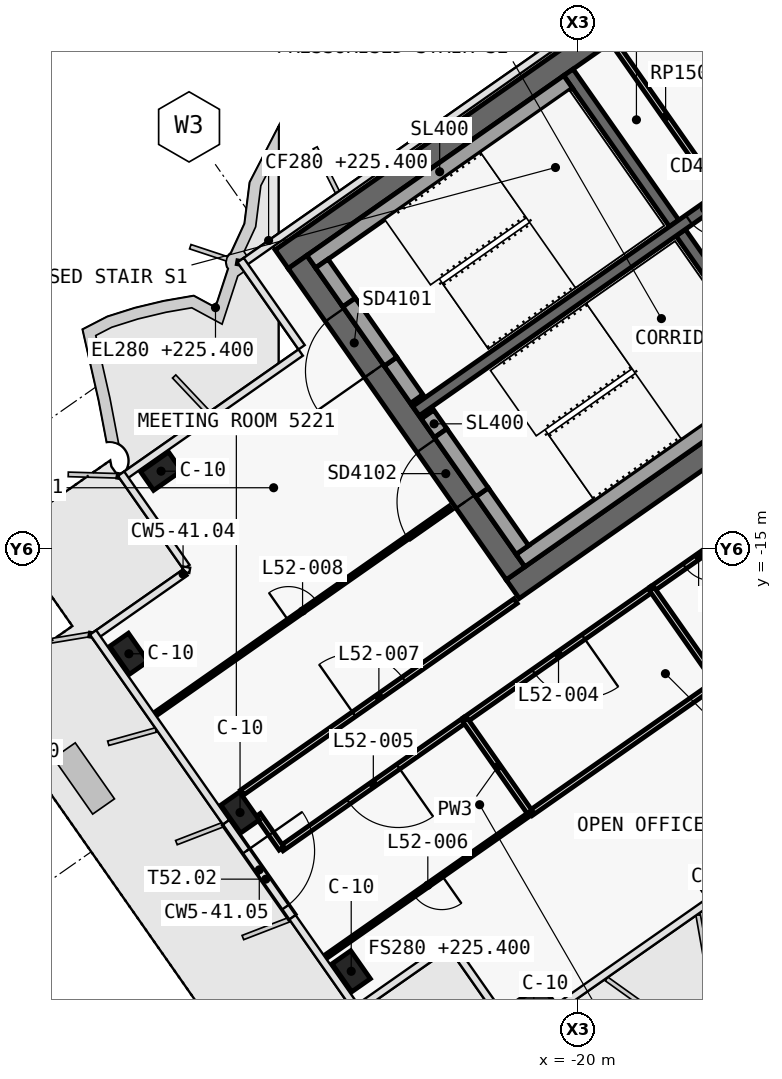
"""IFC4 building model, lengths in metres.
Left out: names, types, materials, properties, quantities, classifications, styles, units other than length and angle.
Written with IfcOpenShell. Run it as: python <this file> out.ifc"""

import sys

from ifc_helpers import new_model, si_unit, direction, frame, frame_2d, origin, origin_2d, place, context, subcontext, project, spatial, polyline, rectangle, outline, extrude, element, fill, save


model = new_model("IFC4")
c1 = context("Model", 3, precision=1e-05, world=origin(), true_north=direction((0.0, 1.0)))
c2 = subcontext(c1, "Body", "Model", "MODEL_VIEW")
j1 = project(units=[si_unit("LENGTHUNIT", "METRE"), si_unit("PLANEANGLEUNIT", "RADIAN")], contexts=[c1])
p1 = place(None, origin())
s1 = spatial("IfcSite", under=j1, at=p1, CompositionType="ELEMENT")
p2 = place(p1, origin())
s2 = spatial("IfcBuilding", under=s1, at=p2, CompositionType="ELEMENT")
p3 = place(p2, frame((0.0, 0.0, 225.4)))
s3 = spatial("IfcBuildingStorey", under=s2, at=p3, CompositionType="ELEMENT", Elevation=225.4)
p4 = place(p3, frame((-0.028, 12.066, 0.0), z_axis=(0.0, 0.0, 1.0), x_axis=(-0.819151382952, -0.573577380837, 0.0)))
e1 = element("IfcWall", 1, at=p4, inside=s3, PredefinedType="SHEAR", context=c2, shape_type="SweptSolid", body=[
    extrude(outline(polyline([(33.898, 0.3), (0.42, 0.3), (0.0, -0.3), (33.898, -0.3), (33.898, 0.3)])), origin(), (0.0, 0.0, 1.0), 3.9),
])
p5 = place(p3, frame((-0.028, -0.874, 0.0), z_axis=(0.0, 0.0, 1.0), x_axis=(-0.819150035022, -0.573579305871, 0.0)))
e2 = element("IfcWall", 2, at=p5, inside=s3, PredefinedType="SHEAR", context=c2, shape_type="SweptSolid", body=[
    extrude(outline(polyline([(26.476, 0.3), (0.42, 0.3), (0.0, -0.3), (26.476, -0.3), (26.476, 0.3)])), origin(), (0.0, 0.0, 1.0), 3.9),
])
p6 = place(p5, frame((2.976, 0.0, 0.0)))
e3 = element("IfcOpeningElement", 3, at=p6, cuts=e2, PredefinedType="OPENING", context=c2, shape_type="SweptSolid", body=[
    extrude(rectangle(XDim=2.4, YDim=2.1, at=frame_2d((1.2, 1.05))), frame((0.0, 0.31, 0.0), z_axis=(0.0, -1.0, 0.0), x_axis=(1.0, 0.0, 0.0)), (0.0, 0.0, 1.0), 0.62),
])
p7 = place(p5, frame((11.776, 0.0, 0.0)))
e4 = element("IfcOpeningElement", 4, at=p7, cuts=e2, PredefinedType="OPENING", context=c2, shape_type="SweptSolid", body=[
    extrude(rectangle(XDim=2.4, YDim=2.1, at=frame_2d((1.2, 1.05))), frame((0.0, 0.31, 0.0), z_axis=(0.0, -1.0, 0.0), x_axis=(1.0, 0.0, 0.0)), (0.0, 0.0, 1.0), 0.62),
])
p8 = place(p3, frame((-21.642, -15.642, 0.0), z_axis=(0.0, 0.0, 1.0), x_axis=(-0.573586866468, 0.819144740944, 0.0)))
e5 = element("IfcWall", 5, at=p8, inside=s3, PredefinedType="SHEAR", context=c2, shape_type="SweptSolid", body=[
    extrude(outline(polyline([(0.0, 0.3), (0.0, -0.3), (10.0, -0.3), (10.0, 0.3), (0.0, 0.3)])), origin(), (0.0, 0.0, 1.0), 3.9),
])
p9 = place(p8, frame((6.5, 0.0, 0.0)))
e6 = element("IfcOpeningElement", 6, at=p9, cuts=e5, PredefinedType="OPENING", context=c2, shape_type="SweptSolid", body=[
    extrude(rectangle(XDim=1.8, YDim=2.1, at=frame_2d((0.9, 1.05))), frame((0.0, 0.31, 0.0), z_axis=(0.0, -1.0, 0.0), x_axis=(1.0, 0.0, 0.0)), (0.0, 0.0, 1.0), 0.62),
])
p10 = place(p8, frame((2.3, 0.0, 0.0)))
e7 = element("IfcOpeningElement", 7, at=p10, cuts=e5, PredefinedType="OPENING", context=c2, shape_type="SweptSolid", body=[
    extrude(rectangle(XDim=1.8, YDim=2.1, at=frame_2d((0.9, 1.05))), frame((0.0, 0.31, 0.0), z_axis=(0.0, -1.0, 0.0), x_axis=(1.0, 0.0, 0.0)), (0.0, 0.0, 1.0), 0.62),
])
p11 = place(p3, frame((-14.515, -10.652, 0.0), z_axis=(0.0, 0.0, 1.0), x_axis=(-0.573560315113, 0.819163332265, 0.0)))
e8 = element("IfcWall", 8, at=p11, inside=s3, PredefinedType="SHEAR", context=c2, shape_type="SweptSolid", body=[
    extrude(outline(polyline([(4.85, 0.15), (0.0, 0.15), (0.0, -0.15), (4.85, -0.15), (4.85, 0.15)])), origin(), (0.0, 0.0, 1.0), 3.9),
])
p12 = place(p3, frame((-17.469, -6.433, 0.0), z_axis=(0.0, 0.0, 1.0), x_axis=(-0.573594092424, 0.81913968109, 0.0)))
e9 = element("IfcWall", 9, at=p12, inside=s3, PredefinedType="SHEAR", context=c2, shape_type="SweptSolid", body=[
    extrude(outline(polyline([(4.85, -0.15), (4.85, 0.15), (0.0, 0.15), (0.0, -0.15), (4.85, -0.15)])), origin(), (0.0, 0.0, 1.0), 3.9),
])
p13 = place(p3, frame((-2.638, 3.768, 0.0), z_axis=(0.0, 0.0, 1.0), x_axis=(-0.819155014212, -0.573572194837, 0.0)))
e10 = element("IfcWall", 10, at=p13, inside=s3, PredefinedType="SHEAR", context=c2, shape_type="SweptSolid", body=[
    extrude(outline(polyline([(26.4, 0.15), (0.0, 0.15), (0.0, -0.15), (26.4, -0.15), (26.4, 0.15)])), origin(), (0.0, 0.0, 1.0), 3.9),
])
p14 = place(p13, frame((1.169, 0.0, 0.0)))
e11 = element("IfcOpeningElement", 11, at=p14, cuts=e10, PredefinedType="OPENING", context=c2, shape_type="SweptSolid", body=[
    extrude(rectangle(XDim=1.1, YDim=2.1, at=frame_2d((0.55, 1.05))), frame((0.0, 0.16, 0.0), z_axis=(0.0, -1.0, 0.0), x_axis=(1.0, 0.0, 0.0)), (0.0, 0.0, 1.0), 0.32),
])
p15 = place(p13, frame((3.206, 0.0, 0.0)))
e12 = element("IfcOpeningElement", 12, at=p15, cuts=e10, PredefinedType="OPENING", context=c2, shape_type="SweptSolid", body=[
    extrude(rectangle(XDim=1.1, YDim=2.1, at=frame_2d((0.55, 1.05))), frame((0.0, 0.16, 0.0), z_axis=(0.0, -1.0, 0.0), x_axis=(1.0, 0.0, 0.0)), (0.0, 0.0, 1.0), 0.32),
])
p16 = place(p13, frame((5.244, 0.0, 0.0)))
e13 = element("IfcOpeningElement", 13, at=p16, cuts=e10, PredefinedType="OPENING", context=c2, shape_type="SweptSolid", body=[
    extrude(rectangle(XDim=1.1, YDim=2.1, at=frame_2d((0.55, 1.05))), frame((0.0, 0.16, 0.0), z_axis=(0.0, -1.0, 0.0), x_axis=(1.0, 0.0, 0.0)), (0.0, 0.0, 1.0), 0.32),
])
p17 = place(p13, frame((7.281, 0.0, 0.0)))
e14 = element("IfcOpeningElement", 14, at=p17, cuts=e10, PredefinedType="OPENING", context=c2, shape_type="SweptSolid", body=[
    extrude(rectangle(XDim=1.1, YDim=2.1, at=frame_2d((0.55, 1.05))), frame((0.0, 0.16, 0.0), z_axis=(0.0, -1.0, 0.0), x_axis=(1.0, 0.0, 0.0)), (0.0, 0.0, 1.0), 0.32),
])
p18 = place(p13, frame((9.688, 0.0, 0.0)))
e15 = element("IfcOpeningElement", 15, at=p18, cuts=e10, PredefinedType="OPENING", context=c2, shape_type="SweptSolid", body=[
    extrude(rectangle(XDim=1.1, YDim=2.1, at=frame_2d((0.55, 1.05))), frame((0.0, 0.16, 0.0), z_axis=(0.0, -1.0, 0.0), x_axis=(1.0, 0.0, 0.0)), (0.0, 0.0, 1.0), 0.32),
])
p19 = place(p13, frame((11.863, 0.0, 0.0)))
e16 = element("IfcOpeningElement", 16, at=p19, cuts=e10, PredefinedType="OPENING", context=c2, shape_type="SweptSolid", body=[
    extrude(rectangle(XDim=1.1, YDim=2.1, at=frame_2d((0.55, 1.05))), frame((0.0, 0.16, 0.0), z_axis=(0.0, -1.0, 0.0), x_axis=(1.0, 0.0, 0.0)), (0.0, 0.0, 1.0), 0.32),
])
p20 = place(p13, frame((14.552, 0.0, 0.0)))
e17 = element("IfcOpeningElement", 17, at=p20, cuts=e10, PredefinedType="OPENING", context=c2, shape_type="SweptSolid", body=[
    extrude(rectangle(XDim=1.0, YDim=2.1, at=frame_2d((0.5, 1.05))), frame((0.0, 0.16, 0.0), z_axis=(0.0, -1.0, 0.0), x_axis=(1.0, 0.0, 0.0)), (0.0, 0.0, 1.0), 0.32),
])
p21 = place(p13, frame((16.627, 0.0, 0.0)))
e18 = element("IfcOpeningElement", 18, at=p21, cuts=e10, PredefinedType="OPENING", context=c2, shape_type="SweptSolid", body=[
    extrude(rectangle(XDim=1.0, YDim=2.1, at=frame_2d((0.5, 1.05))), frame((0.0, 0.16, 0.0), z_axis=(0.0, -1.0, 0.0), x_axis=(1.0, 0.0, 0.0)), (0.0, 0.0, 1.0), 0.32),
])
for number, where, z_axis, x_axis in (
    (19, (-16.41, -23.637, 0.0), (0.0, 0.0, 1.0), (-0.819, -0.574, 0.0)),
    (20, (-21.161, -26.964, 0.0), (0.0, 0.0, 1.0), (-0.819, -0.574, 0.0)),
    (21, (-30.969, -12.956, 0.0), (0.0, 0.0, 1.0), (-0.819, -0.574, 0.0)),
    (22, (-25.966, -26.117, 0.0), (0.0, 0.0, 1.0), (-0.574, 0.819, 0.0)),
    (23, (-28.891, -21.939, 0.0), (0.0, 0.0, 1.0), (-0.574, 0.819, 0.0)),
    (24, (-31.816, -17.761, 0.0), (0.0, 0.0, 1.0), (-0.574, 0.819, 0.0)),
):
    element("IfcColumn", number, at=place(p3, frame(where, z_axis=z_axis, x_axis=x_axis)), inside=s3, PredefinedType="COLUMN", context=c2, shape_type="SweptSolid", body=[
        extrude(rectangle(XDim=0.9, YDim=0.6, at=origin_2d()), origin(), (0.0, 0.0, 1.0), 3.9),
    ])
p22 = place(p3, frame((-16.302, -5.616, 0.0), z_axis=(0.0, 0.0, 1.0), x_axis=(-0.573560315113, 0.819163332265, 0.0)))
e25 = element("IfcWall", 25, at=p22, inside=s3, PredefinedType="PARTITIONING", context=c2, shape_type="SweptSolid", body=[
    extrude(rectangle(XDim=4.85, YDim=0.15, at=frame_2d((2.425, 0.0))), origin(), (0.0, 0.0, 1.0), 3.62),
])
p23 = place(p3, frame((-20.259, -2.71, 0.0), z_axis=(0.0, 0.0, 1.0), x_axis=(-0.81914849389, -0.573581506813, 0.0)))
e26 = element("IfcWall", 26, at=p23, inside=s3, PredefinedType="SOLIDWALL", context=c2, shape_type="SweptSolid", body=[
    extrude(rectangle(XDim=8.25, YDim=0.4, at=frame_2d((4.125, 0.0))), origin(), (0.0, 0.0, 1.0), 3.62),
])
p24 = place(p3, frame((-24.244, -11.055, 0.0), z_axis=(0.0, 0.0, 1.0), x_axis=(-0.573571582932, 0.819155442668, 0.0)))
e27 = element("IfcWall", 27, at=p24, inside=s3, PredefinedType="SOLIDWALL", context=c2, shape_type="SweptSolid", body=[
    extrude(rectangle(XDim=1.2, YDim=0.4, at=frame_2d((0.6, 0.0))), origin(), (0.0, 0.0, 1.0), 3.62),
])
p25 = place(p3, frame((-26.022, -8.515, 0.0), z_axis=(0.0, 0.0, 1.0), x_axis=(-0.573619628835, 0.819121798889, 0.0)))
e28 = element("IfcWall", 28, at=p25, inside=s3, PredefinedType="SOLIDWALL", context=c2, shape_type="SweptSolid", body=[
    extrude(rectangle(XDim=1.25, YDim=0.4, at=frame_2d((0.625, 0.0))), origin(), (0.0, 0.0, 1.0), 3.62),
])
p26 = place(p3, frame((-24.932, -10.072, 2.15), z_axis=(0.0, 0.0, 1.0), x_axis=(-0.573591692345, 0.819141361715, 0.0)))
e29 = element("IfcWall", 29, at=p26, inside=s3, PredefinedType="SOLIDWALL", context=c2, shape_type="SweptSolid", body=[
    extrude(rectangle(XDim=1.9, YDim=0.4, at=frame_2d((0.95, 0.0))), origin(), (0.0, 0.0, 1.0), 1.47),
])
p27 = place(p3, frame((-14.753, -10.574, 0.0), z_axis=(0.0, 0.0, 1.0), x_axis=(-0.819158229677, -0.573567602601, 0.0)))
e30 = element("IfcWall", 30, at=p27, inside=s3, PredefinedType="SOLIDWALL", context=c2, shape_type="SweptSolid", body=[
    extrude(rectangle(XDim=8.25, YDim=0.4, at=frame_2d((4.125, 0.0))), origin(), (0.0, 0.0, 1.0), 3.62),
])
p28 = place(p3, frame((-21.462, -15.028, 0.0), z_axis=(0.0, 0.0, 1.0), x_axis=(-0.573559770908, 0.819163713305, 0.0)))
e31 = element("IfcWall", 31, at=p28, inside=s3, PredefinedType="SOLIDWALL", context=c2, shape_type="SweptSolid", body=[
    extrude(rectangle(XDim=1.85, YDim=0.4, at=frame_2d((0.925, 0.0))), origin(), (0.0, 0.0, 1.0), 3.62),
])
p29 = place(p3, frame((-23.613, -11.956, 0.0), z_axis=(0.0, 0.0, 1.0), x_axis=(-0.573435029941, 0.819251039936, 0.0)))
e32 = element("IfcWall", 32, at=p29, inside=s3, PredefinedType="SOLIDWALL", context=c2, shape_type="SweptSolid", body=[
    extrude(rectangle(XDim=0.6, YDim=0.4, at=frame_2d((0.3, 0.0))), origin(), (0.0, 0.0, 1.0), 3.62),
])
p30 = place(p3, frame((-22.523, -13.512, 2.15), z_axis=(0.0, 0.0, 1.0), x_axis=(-0.573591692345, 0.819141361715, 0.0)))
e33 = element("IfcWall", 33, at=p30, inside=s3, PredefinedType="SOLIDWALL", context=c2, shape_type="SweptSolid", body=[
    extrude(rectangle(XDim=1.9, YDim=0.4, at=frame_2d((0.95, 0.0))), origin(), (0.0, 0.0, 1.0), 1.47),
])
p31 = place(p3, frame((-29.243, -22.222, 0.0), z_axis=(0.0, 0.0, 1.0), x_axis=(0.57360481557, -0.819132172213, 0.0)))
e34 = element("IfcWall", 34, at=p31, inside=s3, PredefinedType="SOLIDWALL", context=c2, shape_type="SweptSolid", body=[
    extrude(rectangle(XDim=2.99, YDim=0.2, at=frame_2d((1.495, 0.0))), origin(), (0.0, 0.0, 1.0), 3.62),
])
p32 = place(p31, frame((0.895, 0.0, 0.0)))
e35 = element("IfcOpeningElement", 35, at=p32, cuts=e34, PredefinedType="OPENING", context=c2, shape_type="SweptSolid", body=[
    extrude(rectangle(XDim=1.8, YDim=2.4, at=frame_2d((0.9, 1.2))), frame((0.0, 0.11, 0.0), z_axis=(0.0, -1.0, 0.0), x_axis=(1.0, 0.0, 0.0)), (0.0, 0.0, 1.0), 0.22),
])
p33 = place(p3, frame((-28.834, -21.411, 0.0), z_axis=(0.0, 0.0, 1.0), x_axis=(0.819144386599, 0.57358737251, 0.0)))
e36 = element("IfcWall", 36, at=p33, inside=s3, PredefinedType="PARTITIONING", context=c2, shape_type="SweptSolid", body=[
    extrude(rectangle(XDim=8.78, YDim=0.15, at=frame_2d((4.39, 0.0))), origin(), (0.0, 0.0, 1.0), 3.05),
])
p34 = place(p33, frame((3.59, 0.0, 0.0)))
e37 = element("IfcOpeningElement", 37, at=p34, cuts=e36, PredefinedType="OPENING", context=c2, shape_type="SweptSolid", body=[
    extrude(rectangle(XDim=1.6, YDim=2.1, at=frame_2d((0.8, 1.05))), frame((0.0, 0.085, 0.0), z_axis=(0.0, -1.0, 0.0), x_axis=(1.0, 0.0, 0.0)), (0.0, 0.0, 1.0), 0.17),
])
p35 = place(p3, frame((-15.594, -14.338, 0.0), z_axis=(0.0, 0.0, 1.0), x_axis=(-0.819193738533, -0.573516886193, 0.0)))
e38 = element("IfcWall", 38, at=p35, inside=s3, PredefinedType="PARTITIONING", context=c2, shape_type="SweptSolid", body=[
    extrude(rectangle(XDim=3.004, YDim=0.15, at=frame_2d((1.502, 0.0))), origin(), (0.0, 0.0, 1.0), 3.62),
])
p36 = place(p35, frame((1.052, 0.0, 0.0)))
e39 = element("IfcOpeningElement", 39, at=p36, cuts=e38, PredefinedType="OPENING", context=c2, shape_type="SweptSolid", body=[
    extrude(rectangle(XDim=0.9, YDim=2.1, at=frame_2d((0.45, 1.05))), frame((0.0, 0.085, 0.0), z_axis=(0.0, -1.0, 0.0), x_axis=(1.0, 0.0, 0.0)), (0.0, 0.0, 1.0), 0.17),
])
p37 = place(p3, frame((-18.052, -16.058, 0.0), z_axis=(0.0, 0.0, 1.0), x_axis=(-0.819145946981, -0.573585144111, 0.0)))
e40 = element("IfcWall", 40, at=p37, inside=s3, PredefinedType="PARTITIONING", context=c2, shape_type="SweptSolid", body=[
    extrude(rectangle(XDim=6.004, YDim=0.15, at=frame_2d((3.002, 0.0))), origin(), (0.0, 0.0, 1.0), 3.05),
])
p38 = place(p37, frame((2.202, 0.0, 0.0)))
e41 = element("IfcOpeningElement", 41, at=p38, cuts=e40, PredefinedType="OPENING", context=c2, shape_type="SweptSolid", body=[
    extrude(rectangle(XDim=1.6, YDim=2.1, at=frame_2d((0.8, 1.05))), frame((0.0, 0.085, 0.0), z_axis=(0.0, -1.0, 0.0), x_axis=(1.0, 0.0, 0.0)), (0.0, 0.0, 1.0), 0.17),
])
p39 = place(p3, frame((-22.967, -19.5, 0.0), z_axis=(0.0, 0.0, 1.0), x_axis=(-0.819156123335, -0.573570610825, 0.0)))
e42 = element("IfcWall", 42, at=p39, inside=s3, PredefinedType="PARTITIONING", context=c2, shape_type="SweptSolid", body=[
    extrude(rectangle(XDim=5.902, YDim=0.15, at=frame_2d((2.951, 0.0))), origin(), (0.0, 0.0, 1.0), 3.05),
])
p40 = place(p39, frame((2.151, 0.0, 0.0)))
e43 = element("IfcOpeningElement", 43, at=p40, cuts=e42, PredefinedType="OPENING", context=c2, shape_type="SweptSolid", body=[
    extrude(rectangle(XDim=1.6, YDim=2.1, at=frame_2d((0.8, 1.05))), frame((0.0, 0.085, 0.0), z_axis=(0.0, -1.0, 0.0), x_axis=(1.0, 0.0, 0.0)), (0.0, 0.0, 1.0), 0.17),
])
p41 = place(p3, frame((-27.802, -22.885, 0.0), z_axis=(0.0, 0.0, 1.0), x_axis=(-0.573629982879, 0.819114547998, 0.0)))
e44 = element("IfcWall", 44, at=p41, inside=s3, PredefinedType="PARTITIONING", context=c2, shape_type="SweptSolid", body=[
    extrude(rectangle(XDim=1.075, YDim=0.15, at=frame_2d((0.538, 0.0))), origin(), (0.0, 0.0, 1.0), 3.62),
])
p42 = place(p3, frame((-31.129, -19.354, 0.0), z_axis=(0.0, 0.0, 1.0), x_axis=(0.819154480923, 0.573572956461, 0.0)))
e45 = element("IfcWall", 45, at=p42, inside=s3, PredefinedType="PARTITIONING", context=c2, shape_type="SweptSolid", body=[
    extrude(rectangle(XDim=9.48, YDim=0.1, at=frame_2d((4.74, 0.0))), origin(), (0.0, 0.0, 1.0), 3.0),
])
p43 = place(p42, frame((4.29, 0.0, 0.0)))
e46 = element("IfcOpeningElement", 46, at=p43, cuts=e45, PredefinedType="OPENING", context=c2, shape_type="SweptSolid", body=[
    extrude(rectangle(XDim=0.9, YDim=2.1, at=frame_2d((0.45, 1.05))), frame((0.0, 0.06, 0.0), z_axis=(0.0, -1.0, 0.0), x_axis=(1.0, 0.0, 0.0)), (0.0, 0.0, 1.0), 0.12),
])
p44 = place(p3, frame((-16.332, -18.519, 0.0), z_axis=(0.0, 0.0, 1.0), x_axis=(-0.573604249862, 0.819132568355, 0.0)))
e47 = element("IfcWall", 47, at=p44, inside=s3, PredefinedType="PARTITIONING", context=c2, shape_type="SweptSolid", body=[
    extrude(rectangle(XDim=3.002, YDim=0.15, at=frame_2d((1.501, 0.0))), origin(), (0.0, 0.0, 1.0), 3.62),
])
p45 = place(p3, frame((-16.333, -18.517, 0.0), z_axis=(0.0, 0.0, 1.0), x_axis=(-0.819130592339, -0.573607071691, 0.0)))
e48 = element("IfcWall", 48, at=p45, inside=s3, PredefinedType="PARTITIONING", context=c2, shape_type="SweptSolid", body=[
    extrude(rectangle(XDim=6.0, YDim=0.15, at=frame_2d((3.0, 0.0))), origin(), (0.0, 0.0, 1.0), 3.05),
])
p46 = place(p3, frame((-21.248, -21.958, 0.0), z_axis=(0.0, 0.0, 1.0), x_axis=(-0.573560650686, 0.819163097304, 0.0)))
e49 = element("IfcWall", 49, at=p46, inside=s3, PredefinedType="PARTITIONING", context=c2, shape_type="SweptSolid", body=[
    extrude(rectangle(XDim=3.0, YDim=0.15, at=frame_2d((1.5, 0.0))), origin(), (0.0, 0.0, 1.0), 3.62),
])
p47 = place(p3, frame((-21.247, -21.959, 0.0), z_axis=(0.0, 0.0, 1.0), x_axis=(-0.819141541656, -0.573591435374, 0.0)))
e50 = element("IfcWall", 50, at=p47, inside=s3, PredefinedType="PARTITIONING", context=c2, shape_type="SweptSolid", body=[
    extrude(rectangle(XDim=6.6, YDim=0.1, at=frame_2d((3.3, 0.0))), origin(), (0.0, 0.0, 1.0), 3.0),
])
p48 = place(p47, frame((2.85, 0.0, 0.0)))
e51 = element("IfcOpeningElement", 51, at=p48, cuts=e50, PredefinedType="OPENING", context=c2, shape_type="SweptSolid", body=[
    extrude(rectangle(XDim=0.9, YDim=2.1, at=frame_2d((0.45, 1.05))), frame((0.0, 0.06, 0.0), z_axis=(0.0, -1.0, 0.0), x_axis=(1.0, 0.0, 0.0)), (0.0, 0.0, 1.0), 0.12),
])
p49 = place(p21, origin())
e52 = element("IfcDoor", 52, at=p49, inside=s3, OperationType="SINGLE_SWING_RIGHT", PredefinedType="DOOR", context=c2, shape_type="SweptSolid", body=[
    extrude(rectangle(XDim=1.0, YDim=2.1, at=frame_2d((0.5, 1.05))), frame((0.0, 0.025, 0.0), z_axis=(0.0, -1.0, 0.0), x_axis=(1.0, 0.0, 0.0)), (0.0, 0.0, 1.0), 0.05),
])
fill(e18, e52)
p50 = place(p9, origin())
e53 = element("IfcDoor", 53, at=p50, inside=s3, OperationType="DOUBLE_DOOR_SINGLE_SWING", PredefinedType="DOOR", context=c2, shape_type="SweptSolid", body=[
    extrude(rectangle(XDim=1.8, YDim=2.1, at=frame_2d((0.9, 1.05))), frame((0.0, 0.025, 0.0), z_axis=(0.0, -1.0, 0.0), x_axis=(1.0, 0.0, 0.0)), (0.0, 0.0, 1.0), 0.05),
])
fill(e6, e53)
p51 = place(p10, origin())
e54 = element("IfcDoor", 54, at=p51, inside=s3, OperationType="DOUBLE_DOOR_SINGLE_SWING", PredefinedType="DOOR", context=c2, shape_type="SweptSolid", body=[
    extrude(rectangle(XDim=1.8, YDim=2.1, at=frame_2d((0.9, 1.05))), frame((0.0, 0.025, 0.0), z_axis=(0.0, -1.0, 0.0), x_axis=(1.0, 0.0, 0.0)), (0.0, 0.0, 1.0), 0.05),
])
fill(e7, e54)
p52 = place(p32, origin())
e55 = element("IfcDoor", 55, at=p52, inside=s3, OperationType="DOUBLE_DOOR_DOUBLE_SWING", PredefinedType="DOOR", context=c2, shape_type="SweptSolid", body=[
    extrude(rectangle(XDim=1.8, YDim=2.4, at=frame_2d((0.9, 1.2))), frame((0.0, 0.025, 0.0), z_axis=(0.0, -1.0, 0.0), x_axis=(1.0, 0.0, 0.0)), (0.0, 0.0, 1.0), 0.05),
])
fill(e35, e55)
p53 = place(p36, origin())
e56 = element("IfcDoor", 56, at=p53, inside=s3, OperationType="SINGLE_SWING_RIGHT", PredefinedType="DOOR", context=c2, shape_type="SweptSolid", body=[
    extrude(rectangle(XDim=0.9, YDim=2.1, at=frame_2d((0.45, 1.05))), frame((0.0, 0.025, 0.0), z_axis=(0.0, -1.0, 0.0), x_axis=(1.0, 0.0, 0.0)), (0.0, 0.0, 1.0), 0.05),
])
fill(e39, e56)
p54 = place(p38, origin())
e57 = element("IfcDoor", 57, at=p54, inside=s3, OperationType="DOUBLE_DOOR_SINGLE_SWING", PredefinedType="DOOR", context=c2, shape_type="SweptSolid", body=[
    extrude(rectangle(XDim=1.6, YDim=2.1, at=frame_2d((0.8, 1.05))), frame((0.0, 0.025, 0.0), z_axis=(0.0, -1.0, 0.0), x_axis=(1.0, 0.0, 0.0)), (0.0, 0.0, 1.0), 0.05),
])
fill(e41, e57)
p55 = place(p40, origin())
e58 = element("IfcDoor", 58, at=p55, inside=s3, OperationType="DOUBLE_DOOR_SINGLE_SWING", PredefinedType="DOOR", context=c2, shape_type="SweptSolid", body=[
    extrude(rectangle(XDim=1.6, YDim=2.1, at=frame_2d((0.8, 1.05))), frame((0.0, 0.025, 0.0), z_axis=(0.0, -1.0, 0.0), x_axis=(1.0, 0.0, 0.0)), (0.0, 0.0, 1.0), 0.05),
])
fill(e43, e58)
p56 = place(p48, origin())
e59 = element("IfcDoor", 59, at=p56, inside=s3, OperationType="SINGLE_SWING_LEFT", PredefinedType="DOOR", context=c2, shape_type="SweptSolid", body=[
    extrude(rectangle(XDim=0.9, YDim=2.1, at=frame_2d((0.45, 1.05))), frame((0.0, 0.025, 0.0), z_axis=(0.0, -1.0, 0.0), x_axis=(1.0, 0.0, 0.0)), (0.0, 0.0, 1.0), 0.05),
])
fill(e51, e59)
p57 = place(p34, origin())
e60 = element("IfcDoor", 60, at=p57, inside=s3, OperationType="DOUBLE_DOOR_SINGLE_SWING", PredefinedType="DOOR", context=c2, shape_type="SweptSolid", body=[
    extrude(rectangle(XDim=1.6, YDim=2.1, at=frame_2d((0.8, 1.05))), frame((0.0, 0.025, 0.0), z_axis=(0.0, -1.0, 0.0), x_axis=(1.0, 0.0, 0.0)), (0.0, 0.0, 1.0), 0.05),
])
fill(e37, e60)
p58 = place(p43, origin())
e61 = element("IfcDoor", 61, at=p58, inside=s3, OperationType="SINGLE_SWING_LEFT", PredefinedType="DOOR", context=c2, shape_type="SweptSolid", body=[
    extrude(rectangle(XDim=0.9, YDim=2.1, at=frame_2d((0.45, 1.05))), frame((0.0, 0.025, 0.0), z_axis=(0.0, -1.0, 0.0), x_axis=(1.0, 0.0, 0.0)), (0.0, 0.0, 1.0), 0.05),
])
fill(e46, e61)
save(model, sys.argv[1])
